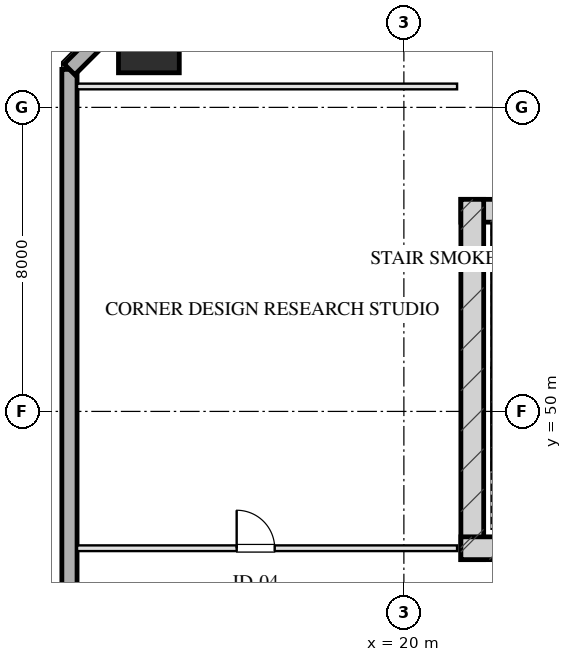
"""IFC4 building model, lengths in metres.
Left out: names, types, materials, properties, quantities, classifications, styles, units other than length and angle.
Written with IfcOpenShell. Run it as: python <this file> out.ifc"""

import sys

from ifc_helpers import new_model, si_unit, direction, frame, frame_2d, origin, origin_2d, place, context, subcontext, project, spatial, rectangle, hollow_rectangle, extrude, element, fill, save


model = new_model("IFC4")
c1 = context("Model", 3, precision=1e-05, world=origin(), true_north=direction((0.0, 1.0)))
c2 = subcontext(c1, "Body", "Model", "MODEL_VIEW")
j1 = project(units=[si_unit("LENGTHUNIT", "METRE"), si_unit("PLANEANGLEUNIT", "RADIAN")], contexts=[c1])
p1 = place(None, origin())
s1 = spatial("IfcSite", under=j1, at=p1, CompositionType="ELEMENT")
p2 = place(p1, origin())
s2 = spatial("IfcBuilding", under=s1, at=p2, CompositionType="ELEMENT")
p3 = place(p2, frame((0.0, 0.0, 134.55)))
s3 = spatial("IfcBuildingStorey", under=s2, at=p3, CompositionType="ELEMENT", Elevation=134.55)
p4 = place(p3, frame((21.5, 55.28, 0.0), z_axis=(0.0, 0.0, 1.0), x_axis=(1.0, 0.0, 0.0)))
e1 = element("IfcWall", 1, at=p4, inside=s3, PredefinedType="SHEAR", context=c2, shape_type="SweptSolid", body=[
    extrude(rectangle(XDim=17.0, YDim=0.6, at=frame_2d((8.5, 0.0))), origin(), (0.0, 0.0, 1.0), 3.45),
])
p5 = place(p3, frame((21.8, 46.1, 0.0), z_axis=(0.0, 0.0, 1.0), x_axis=(0.0, 1.0, 0.0)))
e2 = element("IfcWall", 2, at=p5, inside=s3, PredefinedType="SHEAR", context=c2, shape_type="SweptSolid", body=[
    extrude(rectangle(XDim=9.48, YDim=0.6, at=frame_2d((4.74, 0.0))), origin(), (0.0, 0.0, 1.0), 3.45),
])
p6 = place(p3, frame((21.5, 46.4, 0.0), z_axis=(0.0, 0.0, 1.0), x_axis=(1.0, 0.0, 0.0)))
e3 = element("IfcWall", 3, at=p6, inside=s3, PredefinedType="SHEAR", context=c2, shape_type="SweptSolid", body=[
    extrude(rectangle(XDim=4.22, YDim=0.6, at=frame_2d((2.11, 0.0))), origin(), (0.0, 0.0, 1.0), 3.45),
])
p7 = place(p3, frame((13.29, 59.71, 0.0), z_axis=(0.0, 0.0, 1.0), x_axis=(1.0, 0.0, 0.0)))
e4 = element("IfcColumn", 4, at=p7, inside=s3, PredefinedType="COLUMN", context=c2, shape_type="SweptSolid", body=[
    extrude(hollow_rectangle(XDim=1.6, YDim=1.6, WallThickness=0.055, at=origin_2d()), origin(), (0.0, 0.0, 1.0), 3.451),
])
p8 = place(p3, frame((11.2, 9.0, 0.0), z_axis=(0.0, 0.0, 1.0), x_axis=(0.0, 1.0, 0.0)))
e5 = element("IfcWall", 5, at=p8, inside=s3, PredefinedType="SOLIDWALL", context=c2, shape_type="SweptSolid", body=[
    extrude(rectangle(XDim=50.0, YDim=0.4, at=frame_2d((25.0, 0.0))), origin(), (0.0, 0.0, 1.0), 2.55),
])
p9 = place(p8, frame((17.475, 0.0, 0.75)))
e6 = element("IfcOpeningElement", 6, at=p9, cuts=e5, PredefinedType="OPENING", context=c2, shape_type="SweptSolid", body=[
    extrude(rectangle(XDim=2.25, YDim=1.4, at=frame_2d((1.125, 0.7))), frame((0.0, 0.21, 0.0), z_axis=(0.0, -1.0, 0.0), x_axis=(1.0, 0.0, 0.0)), (0.0, 0.0, 1.0), 0.42),
])
p10 = place(p8, frame((21.275, 0.0, 0.75)))
e7 = element("IfcOpeningElement", 7, at=p10, cuts=e5, PredefinedType="OPENING", context=c2, shape_type="SweptSolid", body=[
    extrude(rectangle(XDim=2.25, YDim=1.4, at=frame_2d((1.125, 0.7))), frame((0.0, 0.21, 0.0), z_axis=(0.0, -1.0, 0.0), x_axis=(1.0, 0.0, 0.0)), (0.0, 0.0, 1.0), 0.42),
])
p11 = place(p8, frame((28.85, 0.0, 0.0)))
e8 = element("IfcOpeningElement", 8, at=p11, cuts=e5, PredefinedType="OPENING", context=c2, shape_type="SweptSolid", body=[
    extrude(rectangle(XDim=1.1, YDim=2.15, at=frame_2d((0.55, 1.075))), frame((0.0, 0.21, 0.0), z_axis=(0.0, -1.0, 0.0), x_axis=(1.0, 0.0, 0.0)), (0.0, 0.0, 1.0), 0.42),
])
p12 = place(p3, frame((11.2, 59.0, 0.0), z_axis=(0.0, 0.0, 1.0), x_axis=(0.707106781187, 0.707106781187, 0.0)))
e9 = element("IfcWall", 9, at=p12, inside=s3, PredefinedType="SOLIDWALL", context=c2, shape_type="SweptSolid", body=[
    extrude(rectangle(XDim=3.96, YDim=0.4, at=frame_2d((1.98, 0.0))), origin(), (0.0, 0.0, 1.0), 2.55),
])
p13 = place(p3, frame((11.4, 58.55, 0.0), z_axis=(0.0, 0.0, 1.0), x_axis=(1.0, 0.0, 0.0)))
e10 = element("IfcWall", 10, at=p13, inside=s3, PredefinedType="PARTITIONING", context=c2, shape_type="SweptSolid", body=[
    extrude(rectangle(XDim=10.0, YDim=0.15, at=frame_2d((5.0, 0.0))), origin(), (0.0, 0.0, 1.0), 3.155),
])
p14 = place(p3, frame((11.4, 46.4, 0.0), z_axis=(0.0, 0.0, 1.0), x_axis=(1.0, 0.0, 0.0)))
e11 = element("IfcWall", 11, at=p14, inside=s3, PredefinedType="PARTITIONING", context=c2, shape_type="SweptSolid", body=[
    extrude(rectangle(XDim=10.0, YDim=0.15, at=frame_2d((5.0, 0.0))), origin(), (0.0, 0.0, 1.0), 3.155),
])
p15 = place(p14, frame((4.2, 0.0, 0.0)))
e12 = element("IfcOpeningElement", 12, at=p15, cuts=e11, PredefinedType="OPENING", context=c2, shape_type="SweptSolid", body=[
    extrude(rectangle(XDim=1.0, YDim=2.05, at=frame_2d((0.5, 1.025))), frame((0.0, 0.085, 0.0), z_axis=(0.0, -1.0, 0.0), x_axis=(1.0, 0.0, 0.0)), (0.0, 0.0, 1.0), 0.17),
])
p16 = place(p15, origin())
e13 = element("IfcDoor", 13, at=p16, inside=s3, OperationType="SINGLE_SWING_LEFT", PredefinedType="DOOR", context=c2, shape_type="SweptSolid", body=[
    extrude(rectangle(XDim=1.0, YDim=2.05, at=frame_2d((0.5, 1.025))), frame((0.0, 0.025, 0.0), z_axis=(0.0, -1.0, 0.0), x_axis=(1.0, 0.0, 0.0)), (0.0, 0.0, 1.0), 0.05),
])
fill(e12, e13)
save(model, sys.argv[1])
